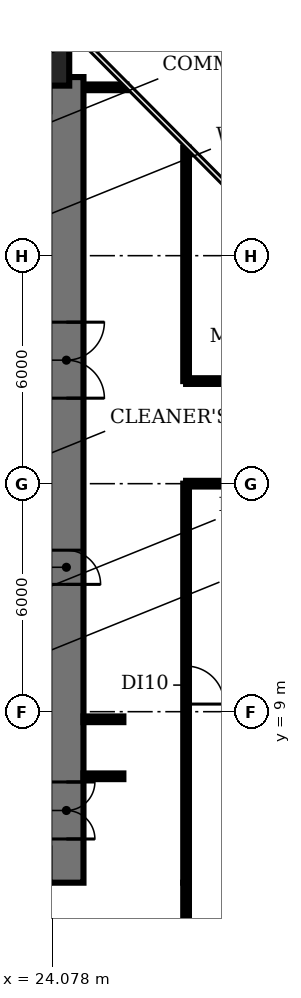
"""IFC4 building model, lengths in metres.
Left out: names, types, materials, properties, quantities, classifications, styles, units other than length and angle.
Written with IfcOpenShell. Run it as: python <this file> out.ifc"""

import sys

from ifc_helpers import new_model, si_unit, direction, frame, frame_2d, origin, origin_2d, place, context, subcontext, project, spatial, rectangle, circle, extrude, element, fill, save


model = new_model("IFC4")
c1 = context("Model", 3, precision=1e-05, world=origin(), true_north=direction((0.0, 1.0)))
c2 = subcontext(c1, "Body", "Model", "MODEL_VIEW")
j1 = project(units=[si_unit("LENGTHUNIT", "METRE"), si_unit("PLANEANGLEUNIT", "RADIAN")], contexts=[c1])
p1 = place(None, origin())
s1 = spatial("IfcSite", under=j1, at=p1, CompositionType="ELEMENT")
p2 = place(p1, origin())
s2 = spatial("IfcBuilding", under=s1, at=p2, CompositionType="ELEMENT")
p3 = place(p2, frame((0.0, 0.0, 50.0)))
s3 = spatial("IfcBuildingStorey", under=s2, at=p3, CompositionType="ELEMENT", Elevation=50.0)
p4 = place(p3, frame((24.0, 26.0, 0.0), z_axis=(0.0, 0.0, 1.0), x_axis=(1.0, 0.0, 0.0)))
e1 = element("IfcColumn", 1, at=p4, inside=s3, PredefinedType="COLUMN", context=c2, shape_type="SweptSolid", body=[
    extrude(circle(Radius=0.525, at=origin_2d()), origin(), (0.0, 0.0, 1.0), 3.85),
])
p5 = place(p3, frame((24.45, 25.7, 0.0), z_axis=(0.0, 0.0, 1.0), x_axis=(0.0, -1.0, 0.0)))
e2 = element("IfcWall", 2, at=p5, inside=s3, PredefinedType="SHEAR", context=c2, shape_type="SweptSolid", body=[
    extrude(rectangle(XDim=21.2, YDim=0.9, at=frame_2d((10.6, 0.0))), origin(), (0.0, 0.0, 1.0), 3.85),
])
p6 = place(p5, frame((18.55, 0.0, 0.0)))
e3 = element("IfcOpeningElement", 3, at=p6, cuts=e2, PredefinedType="OPENING", context=c2, shape_type="SweptSolid", body=[
    extrude(rectangle(XDim=1.5, YDim=2.1, at=frame_2d((0.75, 1.05))), frame((0.0, 0.46, 0.0), z_axis=(0.0, -1.0, 0.0), x_axis=(1.0, 0.0, 0.0)), (0.0, 0.0, 1.0), 0.92),
])
p7 = place(p5, frame((12.45, 0.0, 0.0)))
e4 = element("IfcOpeningElement", 4, at=p7, cuts=e2, PredefinedType="OPENING", context=c2, shape_type="SweptSolid", body=[
    extrude(rectangle(XDim=0.9, YDim=2.1, at=frame_2d((0.45, 1.05))), frame((0.0, 0.46, 0.0), z_axis=(0.0, -1.0, 0.0), x_axis=(1.0, 0.0, 0.0)), (0.0, 0.0, 1.0), 0.92),
])
p8 = place(p5, frame((6.45, 0.0, 0.0)))
e5 = element("IfcOpeningElement", 5, at=p8, cuts=e2, PredefinedType="OPENING", context=c2, shape_type="SweptSolid", body=[
    extrude(rectangle(XDim=2.0, YDim=2.1, at=frame_2d((1.0, 1.05))), frame((0.0, 0.46, 0.0), z_axis=(0.0, -1.0, 0.0), x_axis=(1.0, 0.0, 0.0)), (0.0, 0.0, 1.0), 0.92),
])
for number, where, z_axis, x_axis in (
    (6, (24.9, 7.3, 0.0), (0.0, 0.0, 1.0), (1.0, 0.0, 0.0)),
    (7, (24.9, 8.8, 0.0), (0.0, 0.0, 1.0), (1.0, 0.0, 0.0)),
):
    element("IfcWall", number, at=place(p3, frame(where, z_axis=z_axis, x_axis=x_axis)), inside=s3, PredefinedType="PARTITIONING", context=c2, shape_type="SweptSolid", body=[
        extrude(rectangle(XDim=1.05, YDim=0.15, at=frame_2d((0.525, 0.0))), origin(), (0.0, 0.0, 1.0), 2.83),
    ])
p9 = place(p3, frame((25.0, 25.43, 0.0), z_axis=(0.0, 0.0, 1.0), x_axis=(1.0, 0.0, 0.0)))
e8 = element("IfcWall", 8, at=p9, inside=s3, PredefinedType="PARTITIONING", context=c2, shape_type="SweptSolid", body=[
    extrude(rectangle(XDim=1.03, YDim=0.15, at=frame_2d((0.515, 0.0))), origin(), (0.0, 0.0, 1.0), 2.83),
])
p10 = place(p3, frame((27.6, 0.6, 0.0), z_axis=(0.0, 0.0, 1.0), x_axis=(0.0, 1.0, 0.0)))
e9 = element("IfcWall", 9, at=p10, inside=s3, PredefinedType="PARTITIONING", context=c2, shape_type="SweptSolid", body=[
    extrude(rectangle(XDim=3.9, YDim=0.15, at=frame_2d((1.95, 0.0))), origin(), (0.0, 0.0, 1.0), 2.83),
])
p11 = place(p3, frame((27.6, 15.0, 0.0), z_axis=(0.0, 0.0, 1.0), x_axis=(0.0, -1.0, 0.0)))
e10 = element("IfcWall", 10, at=p11, inside=s3, PredefinedType="PARTITIONING", context=c2, shape_type="SweptSolid", body=[
    extrude(rectangle(XDim=10.5, YDim=0.15, at=frame_2d((5.25, 0.0))), origin(), (0.0, 0.0, 1.0), 2.83),
])
p12 = place(p11, frame((4.8, 0.0, 0.0)))
e11 = element("IfcOpeningElement", 11, at=p12, cuts=e10, PredefinedType="OPENING", context=c2, shape_type="SweptSolid", body=[
    extrude(rectangle(XDim=1.0, YDim=2.1, at=frame_2d((0.5, 1.05))), frame((0.0, 0.085, 0.0), z_axis=(0.0, -1.0, 0.0), x_axis=(1.0, 0.0, 0.0)), (0.0, 0.0, 1.0), 0.17),
])
p13 = place(p3, frame((27.6, 15.0, 0.0), z_axis=(0.0, 0.0, 1.0), x_axis=(1.0, 0.0, 0.0)))
e12 = element("IfcWall", 12, at=p13, inside=s3, PredefinedType="PARTITIONING", context=c2, shape_type="SweptSolid", body=[
    extrude(rectangle(XDim=8.4, YDim=0.15, at=frame_2d((4.2, 0.0))), origin(), (0.0, 0.0, 1.0), 2.83),
])
p14 = place(p3, frame((27.6, 17.7, 0.0), z_axis=(0.0, 0.0, 1.0), x_axis=(0.0, 1.0, 0.0)))
e13 = element("IfcWall", 13, at=p14, inside=s3, PredefinedType="PARTITIONING", context=c2, shape_type="SweptSolid", body=[
    extrude(rectangle(XDim=6.14, YDim=0.15, at=frame_2d((3.07, 0.0))), origin(), (0.0, 0.0, 1.0), 2.83),
])
p15 = place(p3, frame((27.6, 17.7, 0.0), z_axis=(0.0, 0.0, 1.0), x_axis=(1.0, 0.0, 0.0)))
e14 = element("IfcWall", 14, at=p15, inside=s3, PredefinedType="PARTITIONING", context=c2, shape_type="SweptSolid", body=[
    extrude(rectangle(XDim=8.4, YDim=0.15, at=frame_2d((4.2, 0.0))), origin(), (0.0, 0.0, 1.0), 2.83),
])
p16 = place(p15, frame((3.9, 0.0, 0.0)))
e15 = element("IfcOpeningElement", 15, at=p16, cuts=e14, PredefinedType="OPENING", context=c2, shape_type="SweptSolid", body=[
    extrude(rectangle(XDim=1.0, YDim=2.1, at=frame_2d((0.5, 1.05))), frame((0.0, 0.085, 0.0), z_axis=(0.0, -1.0, 0.0), x_axis=(1.0, 0.0, 0.0)), (0.0, 0.0, 1.0), 0.17),
])
p17 = place(p6, origin())
e16 = element("IfcDoor", 16, at=p17, inside=s3, OperationType="DOUBLE_DOOR_SINGLE_SWING", PredefinedType="DOOR", context=c2, shape_type="SweptSolid", body=[
    extrude(rectangle(XDim=1.5, YDim=2.1, at=frame_2d((0.75, 1.05))), frame((0.0, 0.025, 0.0), z_axis=(0.0, -1.0, 0.0), x_axis=(1.0, 0.0, 0.0)), (0.0, 0.0, 1.0), 0.05),
])
fill(e3, e16)
p18 = place(p8, origin())
e17 = element("IfcDoor", 17, at=p18, inside=s3, OperationType="DOUBLE_DOOR_SINGLE_SWING", PredefinedType="DOOR", context=c2, shape_type="SweptSolid", body=[
    extrude(rectangle(XDim=2.0, YDim=2.1, at=frame_2d((1.0, 1.05))), frame((0.0, 0.025, 0.0), z_axis=(0.0, -1.0, 0.0), x_axis=(1.0, 0.0, 0.0)), (0.0, 0.0, 1.0), 0.05),
])
fill(e5, e17)
p19 = place(p12, origin())
e18 = element("IfcDoor", 18, at=p19, inside=s3, OperationType="SINGLE_SWING_RIGHT", PredefinedType="DOOR", context=c2, shape_type="SweptSolid", body=[
    extrude(rectangle(XDim=1.0, YDim=2.1, at=frame_2d((0.5, 1.05))), frame((0.0, 0.025, 0.0), z_axis=(0.0, -1.0, 0.0), x_axis=(1.0, 0.0, 0.0)), (0.0, 0.0, 1.0), 0.05),
])
fill(e11, e18)
save(model, sys.argv[1])
